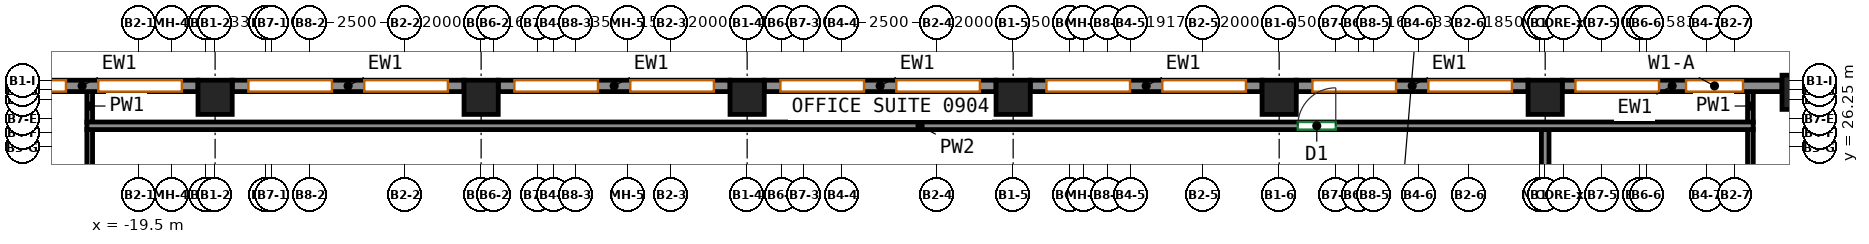
"""IFC4 building model, lengths in metres.
Left out: names, types, materials, properties, quantities, classifications, styles, units other than length and angle.
Written with IfcOpenShell. Run it as: python <this file> out.ifc"""

import sys

from ifc_helpers import new_model, si_unit, direction, frame, frame_2d, origin, origin_2d, place, context, subcontext, project, spatial, rectangle, extrude, source, transform, mapped, element, fill, save


model = new_model("IFC4")
c1 = context("Model", 3, precision=1e-05, world=origin(), true_north=direction((0.0, 1.0)))
c2 = subcontext(c1, "Body", "Model", "MODEL_VIEW")
j1 = project(units=[si_unit("LENGTHUNIT", "METRE"), si_unit("PLANEANGLEUNIT", "RADIAN")], contexts=[c1])
p1 = place(None, origin())
s1 = spatial("IfcSite", under=j1, at=p1, CompositionType="ELEMENT")
p2 = place(p1, origin())
s2 = spatial("IfcBuilding", under=s1, at=p2, CompositionType="ELEMENT")
p3 = place(p2, frame((0.0, 0.0, 43.0)))
s3 = spatial("IfcBuildingStorey", under=s2, at=p3, CompositionType="ELEMENT", Elevation=43.0)
m1 = source(origin(), c2, "Body", "SweptSolid", [
    extrude(rectangle(XDim=0.9, YDim=0.9, at=origin_2d()), origin(), (0.0, 0.0, 1.0), 3.72),
])
for number, where, z_axis, x_axis in (
    (1, (-17.5, 27.55, 0.0), (0.0, 0.0, 1.0), (1.0, 0.0, 0.0)),
    (2, (-10.5, 27.55, 0.0), (0.0, 0.0, 1.0), (1.0, 0.0, 0.0)),
    (3, (-3.5, 27.55, 0.0), (0.0, 0.0, 1.0), (1.0, 0.0, 0.0)),
    (4, (3.5, 27.55, 0.0), (0.0, 0.0, 1.0), (1.0, 0.0, 0.0)),
    (5, (10.5, 27.55, 0.0), (0.0, 0.0, 1.0), (1.0, 0.0, 0.0)),
    (6, (17.5, 27.55, 0.0), (0.0, 0.0, 1.0), (1.0, 0.0, 0.0)),
    (7, (24.182, 27.682, 0.0), (0.0, 0.0, 1.0), (1.0, 0.0, 0.0)),
):
    element("IfcColumn", number, at=place(p3, frame(where, z_axis=z_axis, x_axis=x_axis)), inside=s3, PredefinedType="COLUMN", context=c2, shape_type="MappedRepresentation", body=[
        mapped(m1, transform((0.0, 0.0, 0.0))),
    ])
m2 = source(origin(), c2, "Body", "SweptSolid", [
    extrude(rectangle(XDim=5.782, YDim=0.3, at=frame_2d((2.891, 0.0))), origin(), (0.0, 0.0, 1.0), 3.72),
])
p4 = place(p3, frame((23.732, 27.85, 0.0), z_axis=(0.0, 0.0, 1.0), x_axis=(-1.0, 0.0, 0.0)))
e8 = element("IfcWall", 8, at=p4, inside=s3, PredefinedType="SOLIDWALL", context=c2, shape_type="MappedRepresentation", body=[
    mapped(m2, transform((0.0, 0.0, 0.0))),
])
p5 = place(p4, frame((1.026, 0.0, 0.7)))
e9 = element("IfcOpeningElement", 9, at=p5, cuts=e8, PredefinedType="OPENING", context=c2, shape_type="SweptSolid", body=[
    extrude(rectangle(XDim=1.5, YDim=2.25, at=frame_2d((0.75, 1.125))), frame((0.0, 0.16, 0.0), z_axis=(0.0, -1.0, 0.0), x_axis=(1.0, 0.0, 0.0)), (0.0, 0.0, 1.0), 0.32),
])
p6 = place(p4, frame((3.236, 0.0, 0.7)))
e10 = element("IfcOpeningElement", 10, at=p6, cuts=e8, PredefinedType="OPENING", context=c2, shape_type="SweptSolid", body=[
    extrude(rectangle(XDim=2.2, YDim=2.25, at=frame_2d((1.1, 1.125))), frame((0.0, 0.16, 0.0), z_axis=(0.0, -1.0, 0.0), x_axis=(1.0, 0.0, 0.0)), (0.0, 0.0, 1.0), 0.32),
])
m3 = source(origin(), c2, "Body", "SweptSolid", [
    extrude(rectangle(XDim=6.1, YDim=0.3, at=frame_2d((3.05, 0.0))), origin(), (0.0, 0.0, 1.0), 3.72),
])
p7 = place(p3, frame((17.05, 27.85, 0.0), z_axis=(0.0, 0.0, 1.0), x_axis=(-1.0, 0.0, 0.0)))
e11 = element("IfcWall", 11, at=p7, inside=s3, PredefinedType="SOLIDWALL", context=c2, shape_type="MappedRepresentation", body=[
    mapped(m3, transform((0.0, 0.0, 0.0))),
])
p8 = place(p7, frame((0.425, 0.0, 0.7)))
e12 = element("IfcOpeningElement", 12, at=p8, cuts=e11, PredefinedType="OPENING", context=c2, shape_type="SweptSolid", body=[
    extrude(rectangle(XDim=2.2, YDim=2.25, at=frame_2d((1.1, 1.125))), frame((0.0, 0.16, 0.0), z_axis=(0.0, -1.0, 0.0), x_axis=(1.0, 0.0, 0.0)), (0.0, 0.0, 1.0), 0.32),
])
p9 = place(p7, frame((3.475, 0.0, 0.7)))
e13 = element("IfcOpeningElement", 13, at=p9, cuts=e11, PredefinedType="OPENING", context=c2, shape_type="SweptSolid", body=[
    extrude(rectangle(XDim=2.2, YDim=2.25, at=frame_2d((1.1, 1.125))), frame((0.0, 0.16, 0.0), z_axis=(0.0, -1.0, 0.0), x_axis=(1.0, 0.0, 0.0)), (0.0, 0.0, 1.0), 0.32),
])
p10 = place(p3, frame((10.05, 27.85, 0.0), z_axis=(0.0, 0.0, 1.0), x_axis=(-1.0, 0.0, 0.0)))
e14 = element("IfcWall", 14, at=p10, inside=s3, PredefinedType="SOLIDWALL", context=c2, shape_type="MappedRepresentation", body=[
    mapped(m3, transform((0.0, 0.0, 0.0))),
])
p11 = place(p10, frame((0.425, 0.0, 0.7)))
e15 = element("IfcOpeningElement", 15, at=p11, cuts=e14, PredefinedType="OPENING", context=c2, shape_type="SweptSolid", body=[
    extrude(rectangle(XDim=2.2, YDim=2.25, at=frame_2d((1.1, 1.125))), frame((0.0, 0.16, 0.0), z_axis=(0.0, -1.0, 0.0), x_axis=(1.0, 0.0, 0.0)), (0.0, 0.0, 1.0), 0.32),
])
p12 = place(p10, frame((3.475, 0.0, 0.7)))
e16 = element("IfcOpeningElement", 16, at=p12, cuts=e14, PredefinedType="OPENING", context=c2, shape_type="SweptSolid", body=[
    extrude(rectangle(XDim=2.2, YDim=2.25, at=frame_2d((1.1, 1.125))), frame((0.0, 0.16, 0.0), z_axis=(0.0, -1.0, 0.0), x_axis=(1.0, 0.0, 0.0)), (0.0, 0.0, 1.0), 0.32),
])
p13 = place(p3, frame((3.05, 27.85, 0.0), z_axis=(0.0, 0.0, 1.0), x_axis=(-1.0, 0.0, 0.0)))
e17 = element("IfcWall", 17, at=p13, inside=s3, PredefinedType="SOLIDWALL", context=c2, shape_type="MappedRepresentation", body=[
    mapped(m3, transform((0.0, 0.0, 0.0))),
])
p14 = place(p13, frame((0.425, 0.0, 0.7)))
e18 = element("IfcOpeningElement", 18, at=p14, cuts=e17, PredefinedType="OPENING", context=c2, shape_type="SweptSolid", body=[
    extrude(rectangle(XDim=2.2, YDim=2.25, at=frame_2d((1.1, 1.125))), frame((0.0, 0.16, 0.0), z_axis=(0.0, -1.0, 0.0), x_axis=(1.0, 0.0, 0.0)), (0.0, 0.0, 1.0), 0.32),
])
p15 = place(p13, frame((3.475, 0.0, 0.7)))
e19 = element("IfcOpeningElement", 19, at=p15, cuts=e17, PredefinedType="OPENING", context=c2, shape_type="SweptSolid", body=[
    extrude(rectangle(XDim=2.2, YDim=2.25, at=frame_2d((1.1, 1.125))), frame((0.0, 0.16, 0.0), z_axis=(0.0, -1.0, 0.0), x_axis=(1.0, 0.0, 0.0)), (0.0, 0.0, 1.0), 0.32),
])
p16 = place(p3, frame((-3.95, 27.85, 0.0), z_axis=(0.0, 0.0, 1.0), x_axis=(-1.0, 0.0, 0.0)))
e20 = element("IfcWall", 20, at=p16, inside=s3, PredefinedType="SOLIDWALL", context=c2, shape_type="MappedRepresentation", body=[
    mapped(m3, transform((0.0, 0.0, 0.0))),
])
p17 = place(p16, frame((0.425, 0.0, 0.7)))
e21 = element("IfcOpeningElement", 21, at=p17, cuts=e20, PredefinedType="OPENING", context=c2, shape_type="SweptSolid", body=[
    extrude(rectangle(XDim=2.2, YDim=2.25, at=frame_2d((1.1, 1.125))), frame((0.0, 0.16, 0.0), z_axis=(0.0, -1.0, 0.0), x_axis=(1.0, 0.0, 0.0)), (0.0, 0.0, 1.0), 0.32),
])
p18 = place(p16, frame((3.475, 0.0, 0.7)))
e22 = element("IfcOpeningElement", 22, at=p18, cuts=e20, PredefinedType="OPENING", context=c2, shape_type="SweptSolid", body=[
    extrude(rectangle(XDim=2.2, YDim=2.25, at=frame_2d((1.1, 1.125))), frame((0.0, 0.16, 0.0), z_axis=(0.0, -1.0, 0.0), x_axis=(1.0, 0.0, 0.0)), (0.0, 0.0, 1.0), 0.32),
])
p19 = place(p3, frame((-10.95, 27.85, 0.0), z_axis=(0.0, 0.0, 1.0), x_axis=(-1.0, 0.0, 0.0)))
e23 = element("IfcWall", 23, at=p19, inside=s3, PredefinedType="SOLIDWALL", context=c2, shape_type="MappedRepresentation", body=[
    mapped(m3, transform((0.0, 0.0, 0.0))),
])
p20 = place(p19, frame((0.425, 0.0, 0.7)))
e24 = element("IfcOpeningElement", 24, at=p20, cuts=e23, PredefinedType="OPENING", context=c2, shape_type="SweptSolid", body=[
    extrude(rectangle(XDim=2.2, YDim=2.25, at=frame_2d((1.1, 1.125))), frame((0.0, 0.16, 0.0), z_axis=(0.0, -1.0, 0.0), x_axis=(1.0, 0.0, 0.0)), (0.0, 0.0, 1.0), 0.32),
])
p21 = place(p19, frame((3.475, 0.0, 0.7)))
e25 = element("IfcOpeningElement", 25, at=p21, cuts=e23, PredefinedType="OPENING", context=c2, shape_type="SweptSolid", body=[
    extrude(rectangle(XDim=2.2, YDim=2.25, at=frame_2d((1.1, 1.125))), frame((0.0, 0.16, 0.0), z_axis=(0.0, -1.0, 0.0), x_axis=(1.0, 0.0, 0.0)), (0.0, 0.0, 1.0), 0.32),
])
p22 = place(p3, frame((-17.95, 27.85, 0.0), z_axis=(0.0, 0.0, 1.0), x_axis=(-1.0, 0.0, 0.0)))
e26 = element("IfcWall", 26, at=p22, inside=s3, PredefinedType="SOLIDWALL", context=c2, shape_type="MappedRepresentation", body=[
    mapped(m3, transform((0.0, 0.0, 0.0))),
])
p23 = place(p22, frame((0.425, 0.0, 0.7)))
e27 = element("IfcOpeningElement", 27, at=p23, cuts=e26, PredefinedType="OPENING", context=c2, shape_type="SweptSolid", body=[
    extrude(rectangle(XDim=2.2, YDim=2.25, at=frame_2d((1.1, 1.125))), frame((0.0, 0.16, 0.0), z_axis=(0.0, -1.0, 0.0), x_axis=(1.0, 0.0, 0.0)), (0.0, 0.0, 1.0), 0.32),
])
p24 = place(p22, frame((3.475, 0.0, 0.7)))
e28 = element("IfcOpeningElement", 28, at=p24, cuts=e26, PredefinedType="OPENING", context=c2, shape_type="SweptSolid", body=[
    extrude(rectangle(XDim=2.2, YDim=2.25, at=frame_2d((1.1, 1.125))), frame((0.0, 0.16, 0.0), z_axis=(0.0, -1.0, 0.0), x_axis=(1.0, 0.0, 0.0)), (0.0, 0.0, 1.0), 0.32),
])
p25 = place(p3, frame((-20.8, 3.275, 0.0), z_axis=(0.0, 0.0, 1.0), x_axis=(0.0, 1.0, 0.0)))
e29 = element("IfcWall", 29, at=p25, inside=s3, PredefinedType="PARTITIONING", context=c2, shape_type="SweptSolid", body=[
    extrude(rectangle(XDim=23.435, YDim=0.15, at=frame_2d((11.718, 0.0))), origin(), (0.0, 0.0, 1.0), 3.72),
])
p26 = place(p25, frame((6.31, 0.0, 0.0)))
e30 = element("IfcOpeningElement", 30, at=p26, cuts=e29, PredefinedType="OPENING", context=c2, shape_type="SweptSolid", body=[
    extrude(rectangle(XDim=0.9, YDim=2.1, at=frame_2d((0.45, 1.05))), frame((0.0, 0.085, 0.0), z_axis=(0.0, -1.0, 0.0), x_axis=(1.0, 0.0, 0.0)), (0.0, 0.0, 1.0), 0.17),
])
p27 = place(p3, frame((22.9, 3.275, 0.0), z_axis=(0.0, 0.0, 1.0), x_axis=(0.0, 1.0, 0.0)))
e31 = element("IfcWall", 31, at=p27, inside=s3, PredefinedType="PARTITIONING", context=c2, shape_type="SweptSolid", body=[
    extrude(rectangle(XDim=23.435, YDim=0.15, at=frame_2d((11.718, 0.0))), origin(), (0.0, 0.0, 1.0), 3.72),
])
p28 = place(p27, frame((5.008, 0.0, 0.0)))
e32 = element("IfcOpeningElement", 32, at=p28, cuts=e31, PredefinedType="OPENING", context=c2, shape_type="SweptSolid", body=[
    extrude(rectangle(XDim=0.9, YDim=2.1, at=frame_2d((0.45, 1.05))), frame((0.0, 0.085, 0.0), z_axis=(0.0, -1.0, 0.0), x_axis=(1.0, 0.0, 0.0)), (0.0, 0.0, 1.0), 0.17),
])
for number, where, z_axis, x_axis in (
    (33, (-20.8, 26.891, 0.0), (0.0, 0.0, 1.0), (0.0, 1.0, 0.0)),
    (34, (22.9, 26.891, 0.0), (0.0, 0.0, 1.0), (0.0, 1.0, 0.0)),
):
    element("IfcWall", number, at=place(p3, frame(where, z_axis=z_axis, x_axis=x_axis)), inside=s3, PredefinedType="PARTITIONING", context=c2, shape_type="SweptSolid", body=[
        extrude(rectangle(XDim=0.859, YDim=0.15, at=frame_2d((0.429, 0.0))), origin(), (0.0, 0.0, 1.0), 3.72),
    ])
p29 = place(p3, frame((17.5, 22.0, 0.0), z_axis=(0.0, 0.0, 1.0), x_axis=(0.0, 1.0, 0.0)))
e35 = element("IfcWall", 35, at=p29, inside=s3, PredefinedType="PARTITIONING", context=c2, shape_type="SweptSolid", body=[
    extrude(rectangle(XDim=4.7, YDim=0.2, at=frame_2d((2.35, 0.0))), origin(), (0.0, 0.0, 1.0), 3.72),
])
p30 = place(p3, frame((-20.874, 26.8, 0.0), z_axis=(0.0, 0.0, 1.0), x_axis=(1.0, 0.0, 0.0)))
e36 = element("IfcWall", 36, at=p30, inside=s3, PredefinedType="PARTITIONING", context=c2, shape_type="SweptSolid", body=[
    extrude(rectangle(XDim=43.848, YDim=0.2, at=frame_2d((21.924, 0.0))), origin(), (0.0, 0.0, 1.0), 3.72),
])
p31 = place(p30, frame((31.863, 0.0, 0.0)))
e37 = element("IfcOpeningElement", 37, at=p31, cuts=e36, PredefinedType="OPENING", context=c2, shape_type="SweptSolid", body=[
    extrude(rectangle(XDim=1.0, YDim=2.1, at=frame_2d((0.5, 1.05))), frame((0.0, 0.11, 0.0), z_axis=(0.0, -1.0, 0.0), x_axis=(1.0, 0.0, 0.0)), (0.0, 0.0, 1.0), 0.22),
])
p32 = place(p5, origin())
e38 = element("IfcWindow", 38, at=p32, inside=s3, PartitioningType="SINGLE_PANEL", PredefinedType="WINDOW", context=c2, shape_type="SweptSolid", body=[
    extrude(rectangle(XDim=1.5, YDim=2.25, at=frame_2d((0.75, 1.125))), frame((0.0, 0.03, 0.0), z_axis=(0.0, -1.0, 0.0), x_axis=(1.0, 0.0, 0.0)), (0.0, 0.0, 1.0), 0.06),
])
fill(e9, e38)
p33 = place(p6, origin())
e39 = element("IfcWindow", 39, at=p33, inside=s3, PartitioningType="SINGLE_PANEL", PredefinedType="WINDOW", context=c2, shape_type="SweptSolid", body=[
    extrude(rectangle(XDim=2.2, YDim=2.25, at=frame_2d((1.1, 1.125))), frame((0.0, 0.03, 0.0), z_axis=(0.0, -1.0, 0.0), x_axis=(1.0, 0.0, 0.0)), (0.0, 0.0, 1.0), 0.06),
])
fill(e10, e39)
p34 = place(p8, origin())
e40 = element("IfcWindow", 40, at=p34, inside=s3, PartitioningType="SINGLE_PANEL", PredefinedType="WINDOW", context=c2, shape_type="SweptSolid", body=[
    extrude(rectangle(XDim=2.2, YDim=2.25, at=frame_2d((1.1, 1.125))), frame((0.0, 0.03, 0.0), z_axis=(0.0, -1.0, 0.0), x_axis=(1.0, 0.0, 0.0)), (0.0, 0.0, 1.0), 0.06),
])
fill(e12, e40)
p35 = place(p9, origin())
e41 = element("IfcWindow", 41, at=p35, inside=s3, PartitioningType="SINGLE_PANEL", PredefinedType="WINDOW", context=c2, shape_type="SweptSolid", body=[
    extrude(rectangle(XDim=2.2, YDim=2.25, at=frame_2d((1.1, 1.125))), frame((0.0, 0.03, 0.0), z_axis=(0.0, -1.0, 0.0), x_axis=(1.0, 0.0, 0.0)), (0.0, 0.0, 1.0), 0.06),
])
fill(e13, e41)
p36 = place(p11, origin())
e42 = element("IfcWindow", 42, at=p36, inside=s3, PartitioningType="SINGLE_PANEL", PredefinedType="WINDOW", context=c2, shape_type="SweptSolid", body=[
    extrude(rectangle(XDim=2.2, YDim=2.25, at=frame_2d((1.1, 1.125))), frame((0.0, 0.03, 0.0), z_axis=(0.0, -1.0, 0.0), x_axis=(1.0, 0.0, 0.0)), (0.0, 0.0, 1.0), 0.06),
])
fill(e15, e42)
p37 = place(p12, origin())
e43 = element("IfcWindow", 43, at=p37, inside=s3, PartitioningType="SINGLE_PANEL", PredefinedType="WINDOW", context=c2, shape_type="SweptSolid", body=[
    extrude(rectangle(XDim=2.2, YDim=2.25, at=frame_2d((1.1, 1.125))), frame((0.0, 0.03, 0.0), z_axis=(0.0, -1.0, 0.0), x_axis=(1.0, 0.0, 0.0)), (0.0, 0.0, 1.0), 0.06),
])
fill(e16, e43)
p38 = place(p14, origin())
e44 = element("IfcWindow", 44, at=p38, inside=s3, PartitioningType="SINGLE_PANEL", PredefinedType="WINDOW", context=c2, shape_type="SweptSolid", body=[
    extrude(rectangle(XDim=2.2, YDim=2.25, at=frame_2d((1.1, 1.125))), frame((0.0, 0.03, 0.0), z_axis=(0.0, -1.0, 0.0), x_axis=(1.0, 0.0, 0.0)), (0.0, 0.0, 1.0), 0.06),
])
fill(e18, e44)
p39 = place(p15, origin())
e45 = element("IfcWindow", 45, at=p39, inside=s3, PartitioningType="SINGLE_PANEL", PredefinedType="WINDOW", context=c2, shape_type="SweptSolid", body=[
    extrude(rectangle(XDim=2.2, YDim=2.25, at=frame_2d((1.1, 1.125))), frame((0.0, 0.03, 0.0), z_axis=(0.0, -1.0, 0.0), x_axis=(1.0, 0.0, 0.0)), (0.0, 0.0, 1.0), 0.06),
])
fill(e19, e45)
p40 = place(p17, origin())
e46 = element("IfcWindow", 46, at=p40, inside=s3, PartitioningType="SINGLE_PANEL", PredefinedType="WINDOW", context=c2, shape_type="SweptSolid", body=[
    extrude(rectangle(XDim=2.2, YDim=2.25, at=frame_2d((1.1, 1.125))), frame((0.0, 0.03, 0.0), z_axis=(0.0, -1.0, 0.0), x_axis=(1.0, 0.0, 0.0)), (0.0, 0.0, 1.0), 0.06),
])
fill(e21, e46)
p41 = place(p18, origin())
e47 = element("IfcWindow", 47, at=p41, inside=s3, PartitioningType="SINGLE_PANEL", PredefinedType="WINDOW", context=c2, shape_type="SweptSolid", body=[
    extrude(rectangle(XDim=2.2, YDim=2.25, at=frame_2d((1.1, 1.125))), frame((0.0, 0.03, 0.0), z_axis=(0.0, -1.0, 0.0), x_axis=(1.0, 0.0, 0.0)), (0.0, 0.0, 1.0), 0.06),
])
fill(e22, e47)
p42 = place(p20, origin())
e48 = element("IfcWindow", 48, at=p42, inside=s3, PartitioningType="SINGLE_PANEL", PredefinedType="WINDOW", context=c2, shape_type="SweptSolid", body=[
    extrude(rectangle(XDim=2.2, YDim=2.25, at=frame_2d((1.1, 1.125))), frame((0.0, 0.03, 0.0), z_axis=(0.0, -1.0, 0.0), x_axis=(1.0, 0.0, 0.0)), (0.0, 0.0, 1.0), 0.06),
])
fill(e24, e48)
p43 = place(p21, origin())
e49 = element("IfcWindow", 49, at=p43, inside=s3, PartitioningType="SINGLE_PANEL", PredefinedType="WINDOW", context=c2, shape_type="SweptSolid", body=[
    extrude(rectangle(XDim=2.2, YDim=2.25, at=frame_2d((1.1, 1.125))), frame((0.0, 0.03, 0.0), z_axis=(0.0, -1.0, 0.0), x_axis=(1.0, 0.0, 0.0)), (0.0, 0.0, 1.0), 0.06),
])
fill(e25, e49)
p44 = place(p23, origin())
e50 = element("IfcWindow", 50, at=p44, inside=s3, PartitioningType="SINGLE_PANEL", PredefinedType="WINDOW", context=c2, shape_type="SweptSolid", body=[
    extrude(rectangle(XDim=2.2, YDim=2.25, at=frame_2d((1.1, 1.125))), frame((0.0, 0.03, 0.0), z_axis=(0.0, -1.0, 0.0), x_axis=(1.0, 0.0, 0.0)), (0.0, 0.0, 1.0), 0.06),
])
fill(e27, e50)
p45 = place(p24, origin())
e51 = element("IfcWindow", 51, at=p45, inside=s3, PartitioningType="SINGLE_PANEL", PredefinedType="WINDOW", context=c2, shape_type="SweptSolid", body=[
    extrude(rectangle(XDim=2.2, YDim=2.25, at=frame_2d((1.1, 1.125))), frame((0.0, 0.03, 0.0), z_axis=(0.0, -1.0, 0.0), x_axis=(1.0, 0.0, 0.0)), (0.0, 0.0, 1.0), 0.06),
])
fill(e28, e51)
p46 = place(p31, origin())
e52 = element("IfcDoor", 52, at=p46, inside=s3, OperationType="SINGLE_SWING_RIGHT", PredefinedType="DOOR", context=c2, shape_type="SweptSolid", body=[
    extrude(rectangle(XDim=1.0, YDim=2.1, at=frame_2d((0.5, 1.05))), frame((0.0, 0.025, 0.0), z_axis=(0.0, -1.0, 0.0), x_axis=(1.0, 0.0, 0.0)), (0.0, 0.0, 1.0), 0.05),
])
fill(e37, e52)
save(model, sys.argv[1])
